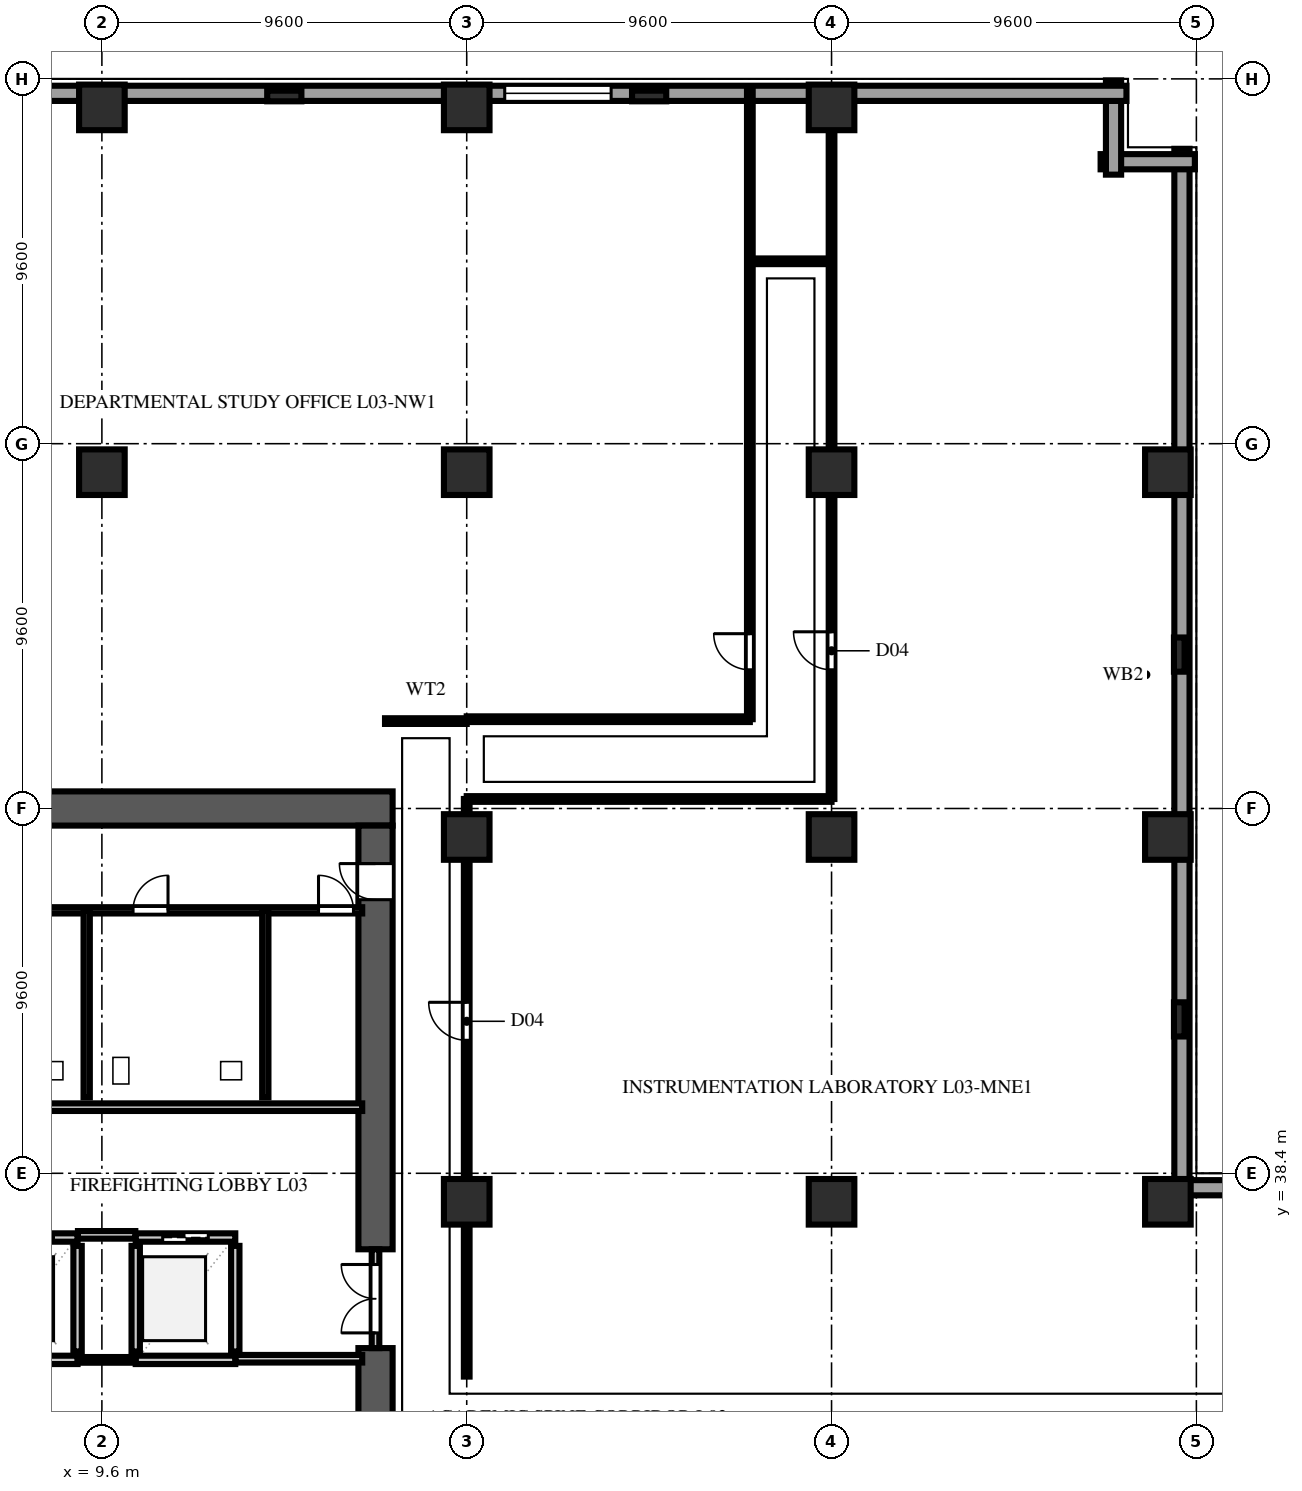
"""IFC4 building model, lengths in metres.
Left out: names, types, materials, properties, quantities, classifications, styles, units other than length and angle.
Written with IfcOpenShell. Run it as: python <this file> out.ifc"""

import sys

from ifc_helpers import new_model, si_unit, direction, frame, frame_2d, origin, origin_2d, place, context, subcontext, project, spatial, rectangle, extrude, element, fill, save


model = new_model("IFC4")
c1 = context("Model", 3, precision=1e-05, world=origin(), true_north=direction((0.0, 1.0)))
c2 = subcontext(c1, "Body", "Model", "MODEL_VIEW")
j1 = project(units=[si_unit("LENGTHUNIT", "METRE"), si_unit("PLANEANGLEUNIT", "RADIAN")], contexts=[c1])
p1 = place(None, origin())
s1 = spatial("IfcSite", under=j1, at=p1, CompositionType="ELEMENT")
p2 = place(p1, origin())
s2 = spatial("IfcBuilding", under=s1, at=p2, CompositionType="ELEMENT")
p3 = place(p2, frame((0.0, 0.0, 15.0)))
s3 = spatial("IfcBuildingStorey", under=s2, at=p3, CompositionType="ELEMENT", Elevation=15.0)
p4 = place(p3, frame((2.65, 48.0, 0.0), z_axis=(0.0, 0.0, 1.0), x_axis=(1.0, 0.0, 0.0)))
e1 = element("IfcWall", 1, at=p4, inside=s3, PredefinedType="SHEAR", context=c2, shape_type="SweptSolid", body=[
    extrude(rectangle(XDim=14.6, YDim=0.9, at=frame_2d((7.3, 0.0))), origin(), (0.0, 0.0, 1.0), 4.26),
])
p5 = place(p3, frame((16.8, 26.0, 0.0), z_axis=(0.0, 0.0, 1.0), x_axis=(0.0, 1.0, 0.0)))
e2 = element("IfcWall", 2, at=p5, inside=s3, PredefinedType="SHEAR", context=c2, shape_type="SweptSolid", body=[
    extrude(rectangle(XDim=7.8, YDim=0.9, at=frame_2d((3.9, 0.0))), origin(), (0.0, 0.0, 1.0), 4.26),
])
p6 = place(p3, frame((16.8, 36.4, 0.0), z_axis=(0.0, 0.0, 1.0), x_axis=(0.0, 1.0, 0.0)))
e3 = element("IfcWall", 3, at=p6, inside=s3, PredefinedType="SHEAR", context=c2, shape_type="SweptSolid", body=[
    extrude(rectangle(XDim=11.15, YDim=0.9, at=frame_2d((5.575, 0.0))), origin(), (0.0, 0.0, 1.0), 4.26),
])
p7 = place(p6, frame((9.2, 0.0, 0.0)))
e4 = element("IfcOpeningElement", 4, at=p7, cuts=e3, PredefinedType="OPENING", context=c2, shape_type="SweptSolid", body=[
    extrude(rectangle(XDim=0.95, YDim=2.15, at=frame_2d((0.475, 1.075))), frame((0.0, 0.462, 0.0), z_axis=(0.0, -1.0, 0.0), x_axis=(1.0, 0.0, 0.0)), (0.0, 0.0, 1.0), 0.924),
])
for number, where, z_axis, x_axis in (
    (5, (9.6, 56.85, 0.0), (0.0, 0.0, 1.0), (1.0, 0.0, 0.0)),
    (6, (9.6, 66.45, 0.0), (0.0, 0.0, 1.0), (1.0, 0.0, 0.0)),
    (7, (19.2, 37.65, 0.0), (0.0, 0.0, 1.0), (1.0, 0.0, 0.0)),
    (8, (19.2, 47.25, 0.0), (0.0, 0.0, 1.0), (1.0, 0.0, 0.0)),
    (9, (19.2, 56.85, 0.0), (0.0, 0.0, 1.0), (1.0, 0.0, 0.0)),
    (10, (19.2, 66.45, 0.0), (0.0, 0.0, 1.0), (1.0, 0.0, 0.0)),
    (11, (28.8, 37.65, 0.0), (0.0, 0.0, 1.0), (1.0, 0.0, 0.0)),
    (12, (28.8, 47.25, 0.0), (0.0, 0.0, 1.0), (1.0, 0.0, 0.0)),
    (13, (28.8, 56.85, 0.0), (0.0, 0.0, 1.0), (1.0, 0.0, 0.0)),
    (14, (28.8, 66.45, 0.0), (0.0, 0.0, 1.0), (1.0, 0.0, 0.0)),
    (15, (37.65, 37.65, 0.0), (0.0, 0.0, 1.0), (1.0, 0.0, 0.0)),
    (16, (37.65, 47.25, 0.0), (0.0, 0.0, 1.0), (1.0, 0.0, 0.0)),
    (17, (37.65, 56.85, 0.0), (0.0, 0.0, 1.0), (1.0, 0.0, 0.0)),
):
    element("IfcColumn", number, at=place(p3, frame(where, z_axis=z_axis, x_axis=x_axis)), inside=s3, PredefinedType="COLUMN", context=c2, shape_type="SweptSolid", body=[
        extrude(rectangle(XDim=1.2, YDim=1.2, at=origin_2d()), origin(), (0.0, 0.0, 1.0), 4.6),
    ])
for number, where, z_axis, x_axis in (
    (18, (14.4, 66.75, 0.0), (0.0, 0.0, 1.0), (1.0, 0.0, 0.0)),
    (19, (24.0, 66.75, 0.0), (0.0, 0.0, 1.0), (1.0, 0.0, 0.0)),
    (20, (37.95, 42.45, 0.0), (0.0, 0.0, 1.0), (0.0, 1.0, 0.0)),
    (21, (37.95, 52.05, 0.0), (0.0, 0.0, 1.0), (0.0, 1.0, 0.0)),
):
    element("IfcColumn", number, at=place(p3, frame(where, z_axis=z_axis, x_axis=x_axis)), inside=s3, PredefinedType="PILASTER", context=c2, shape_type="SweptSolid", body=[
        extrude(rectangle(XDim=0.9, YDim=0.28, at=origin_2d()), origin(), (0.0, 0.0, 1.0), 4.6),
    ])
for number, where, z_axis, x_axis in (
    (22, (65.36, 38.02, 0.0), (0.0, 0.0, 1.0), (-1.0, 0.0, 0.0)),
    (23, (38.02, 37.68, 0.0), (0.0, 0.0, 1.0), (0.0, 1.0, 0.0)),
):
    element("IfcWall", number, at=place(p3, frame(where, z_axis=z_axis, x_axis=x_axis)), inside=s3, PredefinedType="SOLIDWALL", context=c2, shape_type="SweptSolid", body=[
        extrude(rectangle(XDim=27.68, YDim=0.4, at=frame_2d((13.84, 0.0))), origin(), (0.0, 0.0, 1.0), 4.26),
    ])
p8 = place(p3, frame((38.36, 65.02, 0.0), z_axis=(0.0, 0.0, 1.0), x_axis=(-1.0, 0.0, 0.0)))
e24 = element("IfcWall", 24, at=p8, inside=s3, PredefinedType="SOLIDWALL", context=c2, shape_type="SweptSolid", body=[
    extrude(rectangle(XDim=2.48, YDim=0.4, at=frame_2d((1.24, 0.0))), origin(), (0.0, 0.0, 1.0), 4.26),
])
p9 = place(p3, frame((36.22, 64.68, 0.0), z_axis=(0.0, 0.0, 1.0), x_axis=(0.0, 1.0, 0.0)))
e25 = element("IfcWall", 25, at=p9, inside=s3, PredefinedType="SOLIDWALL", context=c2, shape_type="SweptSolid", body=[
    extrude(rectangle(XDim=2.48, YDim=0.4, at=frame_2d((1.24, 0.0))), origin(), (0.0, 0.0, 1.0), 4.26),
])
p10 = place(p3, frame((36.56, 66.82, 0.0), z_axis=(0.0, 0.0, 1.0), x_axis=(-1.0, 0.0, 0.0)))
e26 = element("IfcWall", 26, at=p10, inside=s3, PredefinedType="SOLIDWALL", context=c2, shape_type="SweptSolid", body=[
    extrude(rectangle(XDim=34.72, YDim=0.4, at=frame_2d((17.36, 0.0))), origin(), (0.0, 0.0, 1.0), 4.26),
])
p11 = place(p10, frame((13.56, 0.0, 0.75)))
e27 = element("IfcOpeningElement", 27, at=p11, cuts=e26, PredefinedType="OPENING", context=c2, shape_type="SweptSolid", body=[
    extrude(rectangle(XDim=2.8, YDim=2.3, at=frame_2d((1.4, 1.15))), frame((0.0, 0.212, 0.0), z_axis=(0.0, -1.0, 0.0), x_axis=(1.0, 0.0, 0.0)), (0.0, 0.0, 1.0), 0.424),
])
p12 = place(p3, frame((8.96, 33.71, 0.0), z_axis=(0.0, 0.0, 1.0), x_axis=(0.0, 1.0, 0.0)))
e28 = element("IfcWall", 28, at=p12, inside=s3, PredefinedType="SOLIDWALL", context=c2, shape_type="SweptSolid", body=[
    extrude(rectangle(XDim=2.78, YDim=0.22, at=frame_2d((1.39, 0.0))), origin(), (0.0, 0.0, 1.0), 4.26),
])
p13 = place(p3, frame((6.49, 33.49, 0.0), z_axis=(0.0, 0.0, 1.0), x_axis=(1.0, 0.0, 0.0)))
e29 = element("IfcWall", 29, at=p13, inside=s3, PredefinedType="SOLIDWALL", context=c2, shape_type="SweptSolid", body=[
    extrude(rectangle(XDim=2.47, YDim=0.22, at=frame_2d((1.235, 0.0))), origin(), (0.0, 0.0, 1.0), 4.26),
])
p14 = place(p3, frame((6.49, 36.71, 0.0), z_axis=(0.0, 0.0, 1.0), x_axis=(1.0, 0.0, 0.0)))
e30 = element("IfcWall", 30, at=p14, inside=s3, PredefinedType="SOLIDWALL", context=c2, shape_type="SweptSolid", body=[
    extrude(rectangle(XDim=2.47, YDim=0.22, at=frame_2d((1.235, 0.0))), origin(), (0.0, 0.0, 1.0), 4.26),
])
p15 = place(p14, frame((0.635, 0.0, 0.0)))
e31 = element("IfcOpeningElement", 31, at=p15, cuts=e30, PredefinedType="OPENING", context=c2, shape_type="SweptSolid", body=[
    extrude(rectangle(XDim=1.2, YDim=2.2, at=frame_2d((0.6, 1.1))), frame((0.0, 0.122, 0.0), z_axis=(0.0, -1.0, 0.0), x_axis=(1.0, 0.0, 0.0)), (0.0, 0.0, 1.0), 0.244),
])
for number, where, z_axis, x_axis in (
    (32, (10.49, 33.71, 0.0), (0.0, 0.0, 1.0), (0.0, 1.0, 0.0)),
    (33, (13.11, 33.71, 0.0), (0.0, 0.0, 1.0), (0.0, 1.0, 0.0)),
):
    element("IfcWall", number, at=place(p3, frame(where, z_axis=z_axis, x_axis=x_axis)), inside=s3, PredefinedType="SOLIDWALL", context=c2, shape_type="SweptSolid", body=[
        extrude(rectangle(XDim=2.78, YDim=0.22, at=frame_2d((1.39, 0.0))), origin(), (0.0, 0.0, 1.0), 4.26),
    ])
p16 = place(p3, frame((10.49, 33.49, 0.0), z_axis=(0.0, 0.0, 1.0), x_axis=(1.0, 0.0, 0.0)))
e34 = element("IfcWall", 34, at=p16, inside=s3, PredefinedType="SOLIDWALL", context=c2, shape_type="SweptSolid", body=[
    extrude(rectangle(XDim=2.62, YDim=0.22, at=frame_2d((1.31, 0.0))), origin(), (0.0, 0.0, 1.0), 4.26),
])
p17 = place(p3, frame((10.49, 36.71, 0.0), z_axis=(0.0, 0.0, 1.0), x_axis=(1.0, 0.0, 0.0)))
e35 = element("IfcWall", 35, at=p17, inside=s3, PredefinedType="SOLIDWALL", context=c2, shape_type="SweptSolid", body=[
    extrude(rectangle(XDim=2.62, YDim=0.22, at=frame_2d((1.31, 0.0))), origin(), (0.0, 0.0, 1.0), 4.26),
])
p18 = place(p17, frame((0.71, 0.0, 0.0)))
e36 = element("IfcOpeningElement", 36, at=p18, cuts=e35, PredefinedType="OPENING", context=c2, shape_type="SweptSolid", body=[
    extrude(rectangle(XDim=1.2, YDim=2.2, at=frame_2d((0.6, 1.1))), frame((0.0, 0.122, 0.0), z_axis=(0.0, -1.0, 0.0), x_axis=(1.0, 0.0, 0.0)), (0.0, 0.0, 1.0), 0.244),
])
p19 = place(p3, frame((8.97, 36.78, 0.0), z_axis=(0.0, 0.0, 1.0), x_axis=(1.0, 0.0, 0.0)))
e37 = element("IfcWall", 37, at=p19, inside=s3, PredefinedType="SOLIDWALL", context=c2, shape_type="SweptSolid", body=[
    extrude(rectangle(XDim=1.51, YDim=0.2, at=frame_2d((0.755, 0.0))), origin(), (0.0, 0.0, 1.0), 4.26),
])
p20 = place(p3, frame((13.12, 33.52, 0.0), z_axis=(0.0, 0.0, 1.0), x_axis=(1.0, 0.0, 0.0)))
e38 = element("IfcWall", 38, at=p20, inside=s3, PredefinedType="SOLIDWALL", context=c2, shape_type="SweptSolid", body=[
    extrude(rectangle(XDim=3.33, YDim=0.2, at=frame_2d((1.665, 0.0))), origin(), (0.0, 0.0, 1.0), 4.26),
])
p21 = place(p3, frame((6.32, 40.14, 0.0), z_axis=(0.0, 0.0, 1.0), x_axis=(1.0, 0.0, 0.0)))
e39 = element("IfcWall", 39, at=p21, inside=s3, PredefinedType="SOLIDWALL", context=c2, shape_type="SweptSolid", body=[
    extrude(rectangle(XDim=10.13, YDim=0.2, at=frame_2d((5.065, 0.0))), origin(), (0.0, 0.0, 1.0), 4.26),
])
p22 = place(p3, frame((16.8, 33.8, 0.0), z_axis=(0.0, 0.0, 1.0), x_axis=(0.0, 1.0, 0.0)))
e40 = element("IfcWall", 40, at=p22, inside=s3, PredefinedType="SOLIDWALL", context=c2, shape_type="SweptSolid", body=[
    extrude(rectangle(XDim=2.6, YDim=0.2, at=frame_2d((1.3, 0.0))), origin(), (0.0, 0.0, 1.0), 4.26),
])
p23 = place(p22, frame((0.4, 0.0, 0.0)))
e41 = element("IfcOpeningElement", 41, at=p23, cuts=e40, PredefinedType="OPENING", context=c2, shape_type="SweptSolid", body=[
    extrude(rectangle(XDim=1.8, YDim=2.2, at=frame_2d((0.9, 1.1))), frame((0.0, 0.112, 0.0), z_axis=(0.0, -1.0, 0.0), x_axis=(1.0, 0.0, 0.0)), (0.0, 0.0, 1.0), 0.224),
])
p24 = place(p3, frame((8.965, 33.49, 0.0), z_axis=(0.0, 0.0, 1.0), x_axis=(1.0, 0.0, 0.0)))
e42 = element("IfcWall", 42, at=p24, inside=s3, PredefinedType="PARTITIONING", context=c2, shape_type="SweptSolid", body=[
    extrude(rectangle(XDim=1.52, YDim=0.15, at=frame_2d((0.76, 0.0))), origin(), (0.0, 0.0, 1.0), 4.26),
])
p25 = place(p3, frame((6.32, 45.32, 0.0), z_axis=(0.0, 0.0, 1.0), x_axis=(1.0, 0.0, 0.0)))
e43 = element("IfcWall", 43, at=p25, inside=s3, PredefinedType="PLUMBINGWALL", context=c2, shape_type="SweptSolid", body=[
    extrude(rectangle(XDim=10.13, YDim=0.165, at=frame_2d((5.065, 0.0))), origin(), (0.0, 0.0, 1.0), 4.26),
])
p26 = place(p25, frame((0.8, 0.0, 0.0)))
e44 = element("IfcOpeningElement", 44, at=p26, cuts=e43, PredefinedType="OPENING", context=c2, shape_type="SweptSolid", body=[
    extrude(rectangle(XDim=0.92, YDim=2.15, at=frame_2d((0.46, 1.075))), frame((0.0, 0.094, 0.0), z_axis=(0.0, -1.0, 0.0), x_axis=(1.0, 0.0, 0.0)), (0.0, 0.0, 1.0), 0.189),
])
p27 = place(p25, frame((4.1, 0.0, 0.0)))
e45 = element("IfcOpeningElement", 45, at=p27, cuts=e43, PredefinedType="OPENING", context=c2, shape_type="SweptSolid", body=[
    extrude(rectangle(XDim=0.92, YDim=2.15, at=frame_2d((0.46, 1.075))), frame((0.0, 0.094, 0.0), z_axis=(0.0, -1.0, 0.0), x_axis=(1.0, 0.0, 0.0)), (0.0, 0.0, 1.0), 0.189),
])
p28 = place(p25, frame((8.98, 0.0, 0.0)))
e46 = element("IfcOpeningElement", 46, at=p28, cuts=e43, PredefinedType="OPENING", context=c2, shape_type="SweptSolid", body=[
    extrude(rectangle(XDim=0.92, YDim=2.15, at=frame_2d((0.46, 1.075))), frame((0.0, 0.094, 0.0), z_axis=(0.0, -1.0, 0.0), x_axis=(1.0, 0.0, 0.0)), (0.0, 0.0, 1.0), 0.189),
])
for number, where, z_axis, x_axis in (
    (47, (9.2, 40.4, 0.0), (0.0, 0.0, 1.0), (0.0, 1.0, 0.0)),
    (48, (13.9, 40.4, 0.0), (0.0, 0.0, 1.0), (0.0, 1.0, 0.0)),
):
    element("IfcWall", number, at=place(p3, frame(where, z_axis=z_axis, x_axis=x_axis)), inside=s3, PredefinedType="PLUMBINGWALL", context=c2, shape_type="SweptSolid", body=[
        extrude(rectangle(XDim=4.92, YDim=0.165, at=frame_2d((2.46, 0.0))), origin(), (0.0, 0.0, 1.0), 4.26),
    ])
p29 = place(p3, frame((17.05, 50.3, 0.0), z_axis=(0.0, 0.0, 1.0), x_axis=(1.0, 0.0, 0.0)))
e49 = element("IfcWall", 49, at=p29, inside=s3, PredefinedType="PARTITIONING", context=c2, shape_type="SweptSolid", body=[
    extrude(rectangle(XDim=2.15, YDim=0.15, at=frame_2d((1.075, 0.0))), origin(), (0.0, 0.0, 1.0), 4.26),
])
p30 = place(p3, frame((19.2, 33.05, 0.0), z_axis=(0.0, 0.0, 1.0), x_axis=(0.0, 1.0, 0.0)))
e50 = element("IfcWall", 50, at=p30, inside=s3, PredefinedType="PARTITIONING", context=c2, shape_type="SweptSolid", body=[
    extrude(rectangle(XDim=15.2, YDim=0.15, at=frame_2d((7.6, 0.0))), origin(), (0.0, 0.0, 1.0), 3.644),
])
p31 = place(p30, frame((8.85, 0.0, 0.0)))
e51 = element("IfcOpeningElement", 51, at=p31, cuts=e50, PredefinedType="OPENING", context=c2, shape_type="SweptSolid", body=[
    extrude(rectangle(XDim=1.0, YDim=2.2, at=frame_2d((0.5, 1.1))), frame((0.0, 0.087, 0.0), z_axis=(0.0, -1.0, 0.0), x_axis=(1.0, 0.0, 0.0)), (0.0, 0.0, 1.0), 0.174),
])
p32 = place(p3, frame((19.2, 48.25, 0.0), z_axis=(0.0, 0.0, 1.0), x_axis=(1.0, 0.0, 0.0)))
e52 = element("IfcWall", 52, at=p32, inside=s3, PredefinedType="PARTITIONING", context=c2, shape_type="SweptSolid", body=[
    extrude(rectangle(XDim=9.6, YDim=0.15, at=frame_2d((4.8, 0.0))), origin(), (0.0, 0.0, 1.0), 4.26),
])
p33 = place(p3, frame((19.2, 50.35, 0.0), z_axis=(0.0, 0.0, 1.0), x_axis=(1.0, 0.0, 0.0)))
e53 = element("IfcWall", 53, at=p33, inside=s3, PredefinedType="PARTITIONING", context=c2, shape_type="SweptSolid", body=[
    extrude(rectangle(XDim=7.45, YDim=0.15, at=frame_2d((3.725, 0.0))), origin(), (0.0, 0.0, 1.0), 4.26),
])
p34 = place(p3, frame((26.65, 62.4, 0.0), z_axis=(0.0, 0.0, 1.0), x_axis=(1.0, 0.0, 0.0)))
e54 = element("IfcWall", 54, at=p34, inside=s3, PredefinedType="PARTITIONING", context=c2, shape_type="SweptSolid", body=[
    extrude(rectangle(XDim=2.15, YDim=0.15, at=frame_2d((1.075, 0.0))), origin(), (0.0, 0.0, 1.0), 4.26),
])
p35 = place(p3, frame((28.8, 48.25, 0.0), z_axis=(0.0, 0.0, 1.0), x_axis=(0.0, 1.0, 0.0)))
e55 = element("IfcWall", 55, at=p35, inside=s3, PredefinedType="PARTITIONING", context=c2, shape_type="SweptSolid", body=[
    extrude(rectangle(XDim=18.2, YDim=0.15, at=frame_2d((9.1, 0.0))), origin(), (0.0, 0.0, 1.0), 3.644),
])
p36 = place(p35, frame((3.4, 0.0, 0.0)))
e56 = element("IfcOpeningElement", 56, at=p36, cuts=e55, PredefinedType="OPENING", context=c2, shape_type="SweptSolid", body=[
    extrude(rectangle(XDim=1.0, YDim=2.2, at=frame_2d((0.5, 1.1))), frame((0.0, 0.087, 0.0), z_axis=(0.0, -1.0, 0.0), x_axis=(1.0, 0.0, 0.0)), (0.0, 0.0, 1.0), 0.174),
])
p37 = place(p3, frame((28.8, 66.45, 0.0), z_axis=(0.0, 0.0, 1.0), x_axis=(0.0, 1.0, 0.0)))
e57 = element("IfcWall", 57, at=p37, inside=s3, PredefinedType="PARTITIONING", context=c2, shape_type="SweptSolid", body=[
    extrude(rectangle(XDim=0.53, YDim=0.15, at=frame_2d((0.265, 0.0))), origin(), (0.0, 0.0, 1.0), 4.26),
])
p38 = place(p3, frame((26.65, 50.35, 0.0), z_axis=(0.0, 0.0, 1.0), x_axis=(0.0, 1.0, 0.0)))
e58 = element("IfcWall", 58, at=p38, inside=s3, PredefinedType="PARTITIONING", context=c2, shape_type="SweptSolid", body=[
    extrude(rectangle(XDim=16.63, YDim=0.15, at=frame_2d((8.315, 0.0))), origin(), (0.0, 0.0, 1.0), 4.26),
])
p39 = place(p38, frame((1.3, 0.0, 0.0)))
e59 = element("IfcOpeningElement", 59, at=p39, cuts=e58, PredefinedType="OPENING", context=c2, shape_type="SweptSolid", body=[
    extrude(rectangle(XDim=0.95, YDim=2.15, at=frame_2d((0.475, 1.075))), frame((0.0, 0.087, 0.0), z_axis=(0.0, -1.0, 0.0), x_axis=(1.0, 0.0, 0.0)), (0.0, 0.0, 1.0), 0.174),
])
p40 = place(p11, origin())
e60 = element("IfcWindow", 60, at=p40, inside=s3, PartitioningType="TRIPLE_PANEL_VERTICAL", PredefinedType="WINDOW", context=c2, shape_type="SweptSolid", body=[
    extrude(rectangle(XDim=2.8, YDim=2.3, at=frame_2d((1.4, 1.15))), frame((0.0, 0.11, 0.0), z_axis=(0.0, -1.0, 0.0), x_axis=(1.0, 0.0, 0.0)), (0.0, 0.0, 1.0), 0.06),
])
fill(e27, e60)
p41 = place(p15, origin())
e61 = element("IfcDoor", 61, at=p41, inside=s3, OperationType="DOUBLE_DOOR_SLIDING", PredefinedType="DOOR", context=c2, shape_type="SweptSolid", body=[
    extrude(rectangle(XDim=1.2, YDim=2.2, at=frame_2d((0.6, 1.1))), frame((0.0, 0.025, 0.0), z_axis=(0.0, -1.0, 0.0), x_axis=(1.0, 0.0, 0.0)), (0.0, 0.0, 1.0), 0.05),
])
fill(e31, e61)
p42 = place(p18, origin())
e62 = element("IfcDoor", 62, at=p42, inside=s3, OperationType="DOUBLE_DOOR_SLIDING", PredefinedType="DOOR", context=c2, shape_type="SweptSolid", body=[
    extrude(rectangle(XDim=1.2, YDim=2.2, at=frame_2d((0.6, 1.1))), frame((0.0, 0.025, 0.0), z_axis=(0.0, -1.0, 0.0), x_axis=(1.0, 0.0, 0.0)), (0.0, 0.0, 1.0), 0.05),
])
fill(e36, e62)
p43 = place(p7, origin())
e63 = element("IfcDoor", 63, at=p43, inside=s3, OperationType="SINGLE_SWING_RIGHT", PredefinedType="DOOR", context=c2, shape_type="SweptSolid", body=[
    extrude(rectangle(XDim=0.95, YDim=2.15, at=frame_2d((0.475, 1.075))), frame((0.0, 0.025, 0.0), z_axis=(0.0, -1.0, 0.0), x_axis=(1.0, 0.0, 0.0)), (0.0, 0.0, 1.0), 0.05),
])
fill(e4, e63)
p44 = place(p23, origin())
e64 = element("IfcDoor", 64, at=p44, inside=s3, OperationType="DOUBLE_DOOR_SINGLE_SWING", PredefinedType="DOOR", context=c2, shape_type="SweptSolid", body=[
    extrude(rectangle(XDim=1.8, YDim=2.2, at=frame_2d((0.9, 1.1))), frame((0.0, 0.025, 0.0), z_axis=(0.0, -1.0, 0.0), x_axis=(1.0, 0.0, 0.0)), (0.0, 0.0, 1.0), 0.05),
])
fill(e41, e64)
p45 = place(p27, origin())
e65 = element("IfcDoor", 65, at=p45, inside=s3, OperationType="SINGLE_SWING_RIGHT", PredefinedType="DOOR", context=c2, shape_type="SweptSolid", body=[
    extrude(rectangle(XDim=0.92, YDim=2.15, at=frame_2d((0.46, 1.075))), frame((0.0, 0.025, 0.0), z_axis=(0.0, -1.0, 0.0), x_axis=(1.0, 0.0, 0.0)), (0.0, 0.0, 1.0), 0.05),
])
fill(e45, e65)
p46 = place(p28, origin())
e66 = element("IfcDoor", 66, at=p46, inside=s3, OperationType="SINGLE_SWING_LEFT", PredefinedType="DOOR", context=c2, shape_type="SweptSolid", body=[
    extrude(rectangle(XDim=0.92, YDim=2.15, at=frame_2d((0.46, 1.075))), frame((0.0, 0.025, 0.0), z_axis=(0.0, -1.0, 0.0), x_axis=(1.0, 0.0, 0.0)), (0.0, 0.0, 1.0), 0.05),
])
fill(e46, e66)
p47 = place(p31, origin())
e67 = element("IfcDoor", 67, at=p47, inside=s3, OperationType="SINGLE_SWING_RIGHT", PredefinedType="DOOR", context=c2, shape_type="SweptSolid", body=[
    extrude(rectangle(XDim=1.0, YDim=2.2, at=frame_2d((0.5, 1.1))), frame((0.0, 0.025, 0.0), z_axis=(0.0, -1.0, 0.0), x_axis=(1.0, 0.0, 0.0)), (0.0, 0.0, 1.0), 0.05),
])
fill(e51, e67)
p48 = place(p36, origin())
e68 = element("IfcDoor", 68, at=p48, inside=s3, OperationType="SINGLE_SWING_RIGHT", PredefinedType="DOOR", context=c2, shape_type="SweptSolid", body=[
    extrude(rectangle(XDim=1.0, YDim=2.2, at=frame_2d((0.5, 1.1))), frame((0.0, 0.025, 0.0), z_axis=(0.0, -1.0, 0.0), x_axis=(1.0, 0.0, 0.0)), (0.0, 0.0, 1.0), 0.05),
])
fill(e56, e68)
p49 = place(p39, origin())
e69 = element("IfcDoor", 69, at=p49, inside=s3, OperationType="SINGLE_SWING_RIGHT", PredefinedType="DOOR", context=c2, shape_type="SweptSolid", body=[
    extrude(rectangle(XDim=0.95, YDim=2.15, at=frame_2d((0.475, 1.075))), frame((0.0, 0.025, 0.0), z_axis=(0.0, -1.0, 0.0), x_axis=(1.0, 0.0, 0.0)), (0.0, 0.0, 1.0), 0.05),
])
fill(e59, e69)
save(model, sys.argv[1])
